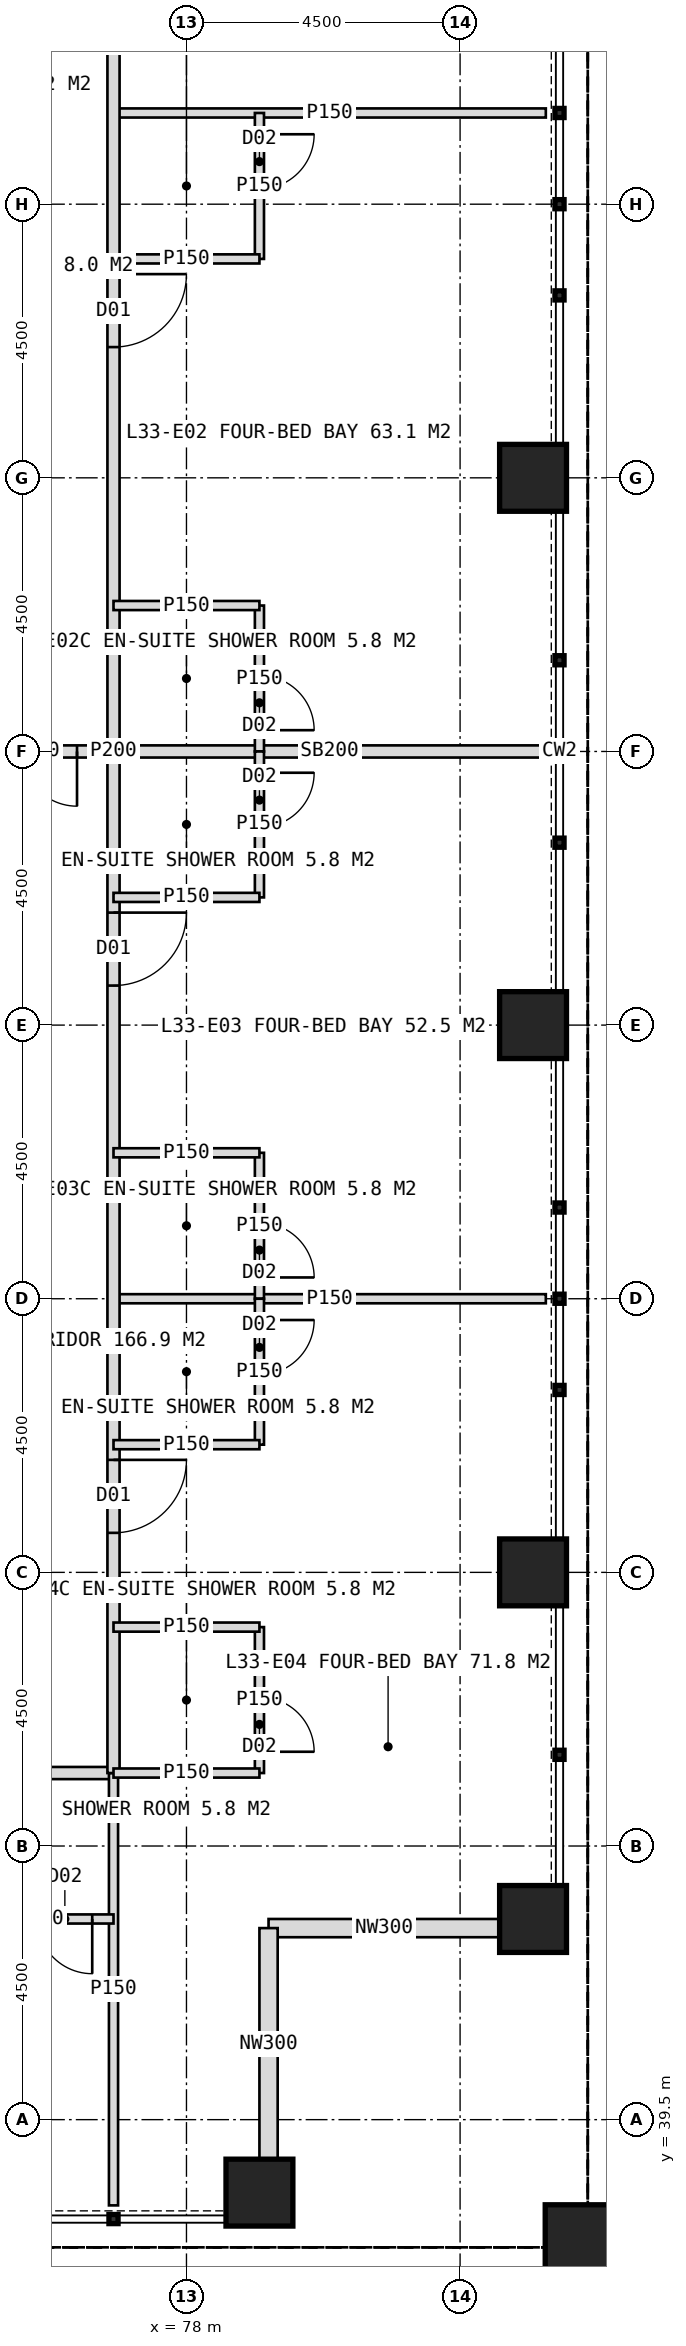
"""IFC4 building model, lengths in metres.
Left out: names, types, materials, properties, quantities, classifications, styles, units other than length and angle.
Written with IfcOpenShell. Run it as: python <this file> out.ifc"""

import sys

from ifc_helpers import new_model, si_unit, direction, frame, frame_2d, origin, origin_2d, place, context, subcontext, project, spatial, rectangle, hollow_rectangle, extrude, element, fill, save


model = new_model("IFC4")
c1 = context("Model", 3, precision=1e-05, world=origin(), true_north=direction((0.0, 1.0)))
c2 = subcontext(c1, "Body", "Model", "MODEL_VIEW")
j1 = project(units=[si_unit("LENGTHUNIT", "METRE"), si_unit("PLANEANGLEUNIT", "RADIAN")], contexts=[c1])
p1 = place(None, origin())
s1 = spatial("IfcSite", under=j1, at=p1, CompositionType="ELEMENT")
p2 = place(p1, origin())
s2 = spatial("IfcBuilding", under=s1, at=p2, CompositionType="ELEMENT")
p3 = place(p2, frame((0.0, 0.0, 140.0)))
s3 = spatial("IfcBuildingStorey", under=s2, at=p3, CompositionType="ELEMENT", Elevation=140.0)
for number, where, z_axis, x_axis in (
    (1, (83.7, 42.8, 0.0), (0.0, 0.0, 1.0), (1.0, 0.0, 0.0)),
    (2, (83.7, 48.5, 0.0), (0.0, 0.0, 1.0), (1.0, 0.0, 0.0)),
    (3, (83.7, 57.5, 0.0), (0.0, 0.0, 1.0), (1.0, 0.0, 0.0)),
    (4, (83.7, 66.5, 0.0), (0.0, 0.0, 1.0), (1.0, 0.0, 0.0)),
    (5, (79.2, 38.3, 0.0), (0.0, 0.0, 1.0), (1.0, 0.0, 0.0)),
):
    element("IfcColumn", number, at=place(p3, frame(where, z_axis=z_axis, x_axis=x_axis)), inside=s3, PredefinedType="COLUMN", context=c2, shape_type="SweptSolid", body=[
        extrude(hollow_rectangle(XDim=1.1, YDim=1.1, WallThickness=0.1, at=origin_2d()), origin(), (0.0, 0.0, 1.0), 4.0),
    ])
p4 = place(p3, frame((84.6, 37.4, 0.0), z_axis=(0.0, 0.0, 1.0), x_axis=(1.0, 0.0, 0.0)))
e6 = element("IfcColumn", 6, at=p4, inside=s3, PredefinedType="COLUMN", context=c2, shape_type="SweptSolid", body=[
    extrude(hollow_rectangle(XDim=1.4, YDim=1.4, WallThickness=0.08, at=origin_2d()), origin(), (0.0, 0.0, 1.0), 4.0),
])
for number, where, z_axis, x_axis in (
    (7, (83.15, 42.65, 0.0), (0.0, 0.0, 1.0), (-1.0, 0.0, 0.0)),
    (8, (79.35, 42.65, 0.0), (0.0, 0.0, 1.0), (0.0, -1.0, 0.0)),
):
    element("IfcWall", number, at=place(p3, frame(where, z_axis=z_axis, x_axis=x_axis)), inside=s3, PredefinedType="ELEMENTEDWALL", context=c2, shape_type="SweptSolid", body=[
        extrude(rectangle(XDim=3.8, YDim=0.3, at=frame_2d((1.9, 0.0))), origin(), (0.0, 0.0, 1.0), 4.0),
    ])
p5 = place(p3, frame((76.8, 45.2, 0.0), z_axis=(0.0, 0.0, 1.0), x_axis=(-1.0, 0.0, 0.0)))
e9 = element("IfcWall", 9, at=p5, inside=s3, PredefinedType="PARTITIONING", context=c2, shape_type="SweptSolid", body=[
    extrude(rectangle(XDim=33.6, YDim=0.2, at=frame_2d((16.8, 0.0))), origin(), (0.0, 0.0, 1.0), 3.75),
])
p6 = place(p5, frame((2.65, 0.0, 0.0)))
e10 = element("IfcOpeningElement", 10, at=p6, cuts=e9, PredefinedType="OPENING", context=c2, shape_type="SweptSolid", body=[
    extrude(rectangle(XDim=1.2, YDim=2.2, at=frame_2d((0.6, 1.1))), frame((0.0, 0.11, 0.0), z_axis=(0.0, -1.0, 0.0), x_axis=(1.0, 0.0, 0.0)), (0.0, 0.0, 1.0), 0.22),
])
p7 = place(p5, frame((11.05, 0.0, 0.0)))
e11 = element("IfcOpeningElement", 11, at=p7, cuts=e9, PredefinedType="OPENING", context=c2, shape_type="SweptSolid", body=[
    extrude(rectangle(XDim=1.2, YDim=2.2, at=frame_2d((0.6, 1.1))), frame((0.0, 0.11, 0.0), z_axis=(0.0, -1.0, 0.0), x_axis=(1.0, 0.0, 0.0)), (0.0, 0.0, 1.0), 0.22),
])
p8 = place(p5, frame((17.95, 0.0, 0.0)))
e12 = element("IfcOpeningElement", 12, at=p8, cuts=e9, PredefinedType="OPENING", context=c2, shape_type="SweptSolid", body=[
    extrude(rectangle(XDim=1.2, YDim=2.2, at=frame_2d((0.6, 1.1))), frame((0.0, 0.11, 0.0), z_axis=(0.0, -1.0, 0.0), x_axis=(1.0, 0.0, 0.0)), (0.0, 0.0, 1.0), 0.22),
])
p9 = place(p5, frame((26.95, 0.0, 0.0)))
e13 = element("IfcOpeningElement", 13, at=p9, cuts=e9, PredefinedType="OPENING", context=c2, shape_type="SweptSolid", body=[
    extrude(rectangle(XDim=1.2, YDim=2.2, at=frame_2d((0.6, 1.1))), frame((0.0, 0.11, 0.0), z_axis=(0.0, -1.0, 0.0), x_axis=(1.0, 0.0, 0.0)), (0.0, 0.0, 1.0), 0.22),
])
p10 = place(p3, frame((76.8, 45.2, 0.0), z_axis=(0.0, 0.0, 1.0), x_axis=(0.0, -1.0, 0.0)))
e14 = element("IfcWall", 14, at=p10, inside=s3, PredefinedType="PARTITIONING", context=c2, shape_type="SweptSolid", body=[
    extrude(rectangle(XDim=7.11, YDim=0.15, at=frame_2d((3.555, 0.0))), origin(), (0.0, 0.0, 1.0), 3.75),
])
p11 = place(p3, frame((76.8, 42.8, 0.0), z_axis=(0.0, 0.0, 1.0), x_axis=(-1.0, 0.0, 0.0)))
e15 = element("IfcWall", 15, at=p11, inside=s3, PredefinedType="PARTITIONING", context=c2, shape_type="SweptSolid", body=[
    extrude(rectangle(XDim=2.4, YDim=0.15, at=frame_2d((1.2, 0.0))), origin(), (0.0, 0.0, 1.0), 2.997),
])
p12 = place(p11, frame((0.35, 0.0, 0.0)))
e16 = element("IfcOpeningElement", 16, at=p12, cuts=e15, PredefinedType="OPENING", context=c2, shape_type="SweptSolid", body=[
    extrude(rectangle(XDim=0.9, YDim=2.1, at=frame_2d((0.45, 1.05))), frame((0.0, 0.085, 0.0), z_axis=(0.0, -1.0, 0.0), x_axis=(1.0, 0.0, 0.0)), (0.0, 0.0, 1.0), 0.17),
])
p13 = place(p3, frame((76.8, 72.5, 0.0), z_axis=(0.0, 0.0, 1.0), x_axis=(1.0, 0.0, 0.0)))
e17 = element("IfcWall", 17, at=p13, inside=s3, PredefinedType="PARTITIONING", context=c2, shape_type="SweptSolid", body=[
    extrude(rectangle(XDim=7.11, YDim=0.15, at=frame_2d((3.555, 0.0))), origin(), (0.0, 0.0, 1.0), 3.75),
])
p14 = place(p3, frame((76.8, 62.0, 0.0), z_axis=(0.0, 0.0, 1.0), x_axis=(1.0, 0.0, 0.0)))
e18 = element("IfcWall", 18, at=p14, inside=s3, PredefinedType="SOLIDWALL", context=c2, shape_type="SweptSolid", body=[
    extrude(rectangle(XDim=7.11, YDim=0.2, at=frame_2d((3.555, 0.0))), origin(), (0.0, 0.0, 1.0), 2.95),
])
p15 = place(p3, frame((76.8, 53.0, 0.0), z_axis=(0.0, 0.0, 1.0), x_axis=(1.0, 0.0, 0.0)))
e19 = element("IfcWall", 19, at=p15, inside=s3, PredefinedType="PARTITIONING", context=c2, shape_type="SweptSolid", body=[
    extrude(rectangle(XDim=7.11, YDim=0.15, at=frame_2d((3.555, 0.0))), origin(), (0.0, 0.0, 1.0), 3.75),
])
p16 = place(p3, frame((76.8, 78.8, 0.0), z_axis=(0.0, 0.0, 1.0), x_axis=(0.0, -1.0, 0.0)))
e20 = element("IfcWall", 20, at=p16, inside=s3, PredefinedType="PARTITIONING", context=c2, shape_type="SweptSolid", body=[
    extrude(rectangle(XDim=33.6, YDim=0.2, at=frame_2d((16.8, 0.0))), origin(), (0.0, 0.0, 1.0), 3.75),
])
p17 = place(p16, frame((2.65, 0.0, 0.0)))
e21 = element("IfcOpeningElement", 21, at=p17, cuts=e20, PredefinedType="OPENING", context=c2, shape_type="SweptSolid", body=[
    extrude(rectangle(XDim=1.2, YDim=2.2, at=frame_2d((0.6, 1.1))), frame((0.0, 0.11, 0.0), z_axis=(0.0, -1.0, 0.0), x_axis=(1.0, 0.0, 0.0)), (0.0, 0.0, 1.0), 0.22),
])
p18 = place(p16, frame((8.95, 0.0, 0.0)))
e22 = element("IfcOpeningElement", 22, at=p18, cuts=e20, PredefinedType="OPENING", context=c2, shape_type="SweptSolid", body=[
    extrude(rectangle(XDim=1.2, YDim=2.2, at=frame_2d((0.6, 1.1))), frame((0.0, 0.11, 0.0), z_axis=(0.0, -1.0, 0.0), x_axis=(1.0, 0.0, 0.0)), (0.0, 0.0, 1.0), 0.22),
])
p19 = place(p16, frame((19.45, 0.0, 0.0)))
e23 = element("IfcOpeningElement", 23, at=p19, cuts=e20, PredefinedType="OPENING", context=c2, shape_type="SweptSolid", body=[
    extrude(rectangle(XDim=1.2, YDim=2.2, at=frame_2d((0.6, 1.1))), frame((0.0, 0.11, 0.0), z_axis=(0.0, -1.0, 0.0), x_axis=(1.0, 0.0, 0.0)), (0.0, 0.0, 1.0), 0.22),
])
p20 = place(p16, frame((28.45, 0.0, 0.0)))
e24 = element("IfcOpeningElement", 24, at=p20, cuts=e20, PredefinedType="OPENING", context=c2, shape_type="SweptSolid", body=[
    extrude(rectangle(XDim=1.2, YDim=2.2, at=frame_2d((0.6, 1.1))), frame((0.0, 0.11, 0.0), z_axis=(0.0, -1.0, 0.0), x_axis=(1.0, 0.0, 0.0)), (0.0, 0.0, 1.0), 0.22),
])
p21 = place(p3, frame((79.2, 72.5, 0.0), z_axis=(0.0, 0.0, 1.0), x_axis=(0.0, -1.0, 0.0)))
e25 = element("IfcWall", 25, at=p21, inside=s3, PredefinedType="PARTITIONING", context=c2, shape_type="SweptSolid", body=[
    extrude(rectangle(XDim=2.4, YDim=0.15, at=frame_2d((1.2, 0.0))), origin(), (0.0, 0.0, 1.0), 3.75),
])
p22 = place(p21, frame((0.35, 0.0, 0.0)))
e26 = element("IfcOpeningElement", 26, at=p22, cuts=e25, PredefinedType="OPENING", context=c2, shape_type="SweptSolid", body=[
    extrude(rectangle(XDim=0.9, YDim=2.1, at=frame_2d((0.45, 1.05))), frame((0.0, 0.085, 0.0), z_axis=(0.0, -1.0, 0.0), x_axis=(1.0, 0.0, 0.0)), (0.0, 0.0, 1.0), 0.17),
])
p23 = place(p3, frame((76.8, 70.1, 0.0), z_axis=(0.0, 0.0, 1.0), x_axis=(1.0, 0.0, 0.0)))
e27 = element("IfcWall", 27, at=p23, inside=s3, PredefinedType="PARTITIONING", context=c2, shape_type="SweptSolid", body=[
    extrude(rectangle(XDim=2.4, YDim=0.15, at=frame_2d((1.2, 0.0))), origin(), (0.0, 0.0, 1.0), 3.75),
])
p24 = place(p3, frame((79.2, 64.4, 0.0), z_axis=(0.0, 0.0, 1.0), x_axis=(0.0, -1.0, 0.0)))
e28 = element("IfcWall", 28, at=p24, inside=s3, PredefinedType="PARTITIONING", context=c2, shape_type="SweptSolid", body=[
    extrude(rectangle(XDim=2.4, YDim=0.15, at=frame_2d((1.2, 0.0))), origin(), (0.0, 0.0, 1.0), 3.75),
])
p25 = place(p24, frame((1.15, 0.0, 0.0)))
e29 = element("IfcOpeningElement", 29, at=p25, cuts=e28, PredefinedType="OPENING", context=c2, shape_type="SweptSolid", body=[
    extrude(rectangle(XDim=0.9, YDim=2.1, at=frame_2d((0.45, 1.05))), frame((0.0, 0.085, 0.0), z_axis=(0.0, -1.0, 0.0), x_axis=(1.0, 0.0, 0.0)), (0.0, 0.0, 1.0), 0.17),
])
p26 = place(p3, frame((76.8, 64.4, 0.0), z_axis=(0.0, 0.0, 1.0), x_axis=(1.0, 0.0, 0.0)))
e30 = element("IfcWall", 30, at=p26, inside=s3, PredefinedType="PARTITIONING", context=c2, shape_type="SweptSolid", body=[
    extrude(rectangle(XDim=2.4, YDim=0.15, at=frame_2d((1.2, 0.0))), origin(), (0.0, 0.0, 1.0), 3.75),
])
p27 = place(p3, frame((79.2, 62.0, 0.0), z_axis=(0.0, 0.0, 1.0), x_axis=(0.0, -1.0, 0.0)))
e31 = element("IfcWall", 31, at=p27, inside=s3, PredefinedType="PARTITIONING", context=c2, shape_type="SweptSolid", body=[
    extrude(rectangle(XDim=2.4, YDim=0.15, at=frame_2d((1.2, 0.0))), origin(), (0.0, 0.0, 1.0), 3.75),
])
p28 = place(p27, frame((0.35, 0.0, 0.0)))
e32 = element("IfcOpeningElement", 32, at=p28, cuts=e31, PredefinedType="OPENING", context=c2, shape_type="SweptSolid", body=[
    extrude(rectangle(XDim=0.9, YDim=2.1, at=frame_2d((0.45, 1.05))), frame((0.0, 0.085, 0.0), z_axis=(0.0, -1.0, 0.0), x_axis=(1.0, 0.0, 0.0)), (0.0, 0.0, 1.0), 0.17),
])
p29 = place(p3, frame((76.8, 59.6, 0.0), z_axis=(0.0, 0.0, 1.0), x_axis=(1.0, 0.0, 0.0)))
e33 = element("IfcWall", 33, at=p29, inside=s3, PredefinedType="PARTITIONING", context=c2, shape_type="SweptSolid", body=[
    extrude(rectangle(XDim=2.4, YDim=0.15, at=frame_2d((1.2, 0.0))), origin(), (0.0, 0.0, 1.0), 3.75),
])
p30 = place(p3, frame((79.2, 55.4, 0.0), z_axis=(0.0, 0.0, 1.0), x_axis=(0.0, -1.0, 0.0)))
e34 = element("IfcWall", 34, at=p30, inside=s3, PredefinedType="PARTITIONING", context=c2, shape_type="SweptSolid", body=[
    extrude(rectangle(XDim=2.4, YDim=0.15, at=frame_2d((1.2, 0.0))), origin(), (0.0, 0.0, 1.0), 3.75),
])
p31 = place(p30, frame((1.15, 0.0, 0.0)))
e35 = element("IfcOpeningElement", 35, at=p31, cuts=e34, PredefinedType="OPENING", context=c2, shape_type="SweptSolid", body=[
    extrude(rectangle(XDim=0.9, YDim=2.1, at=frame_2d((0.45, 1.05))), frame((0.0, 0.085, 0.0), z_axis=(0.0, -1.0, 0.0), x_axis=(1.0, 0.0, 0.0)), (0.0, 0.0, 1.0), 0.17),
])
p32 = place(p3, frame((76.8, 55.4, 0.0), z_axis=(0.0, 0.0, 1.0), x_axis=(1.0, 0.0, 0.0)))
e36 = element("IfcWall", 36, at=p32, inside=s3, PredefinedType="PARTITIONING", context=c2, shape_type="SweptSolid", body=[
    extrude(rectangle(XDim=2.4, YDim=0.15, at=frame_2d((1.2, 0.0))), origin(), (0.0, 0.0, 1.0), 3.75),
])
p33 = place(p3, frame((79.2, 53.0, 0.0), z_axis=(0.0, 0.0, 1.0), x_axis=(0.0, -1.0, 0.0)))
e37 = element("IfcWall", 37, at=p33, inside=s3, PredefinedType="PARTITIONING", context=c2, shape_type="SweptSolid", body=[
    extrude(rectangle(XDim=2.4, YDim=0.15, at=frame_2d((1.2, 0.0))), origin(), (0.0, 0.0, 1.0), 3.75),
])
p34 = place(p33, frame((0.35, 0.0, 0.0)))
e38 = element("IfcOpeningElement", 38, at=p34, cuts=e37, PredefinedType="OPENING", context=c2, shape_type="SweptSolid", body=[
    extrude(rectangle(XDim=0.9, YDim=2.1, at=frame_2d((0.45, 1.05))), frame((0.0, 0.085, 0.0), z_axis=(0.0, -1.0, 0.0), x_axis=(1.0, 0.0, 0.0)), (0.0, 0.0, 1.0), 0.17),
])
p35 = place(p3, frame((76.8, 50.6, 0.0), z_axis=(0.0, 0.0, 1.0), x_axis=(1.0, 0.0, 0.0)))
e39 = element("IfcWall", 39, at=p35, inside=s3, PredefinedType="PARTITIONING", context=c2, shape_type="SweptSolid", body=[
    extrude(rectangle(XDim=2.4, YDim=0.15, at=frame_2d((1.2, 0.0))), origin(), (0.0, 0.0, 1.0), 3.75),
])
p36 = place(p3, frame((79.2, 47.6, 0.0), z_axis=(0.0, 0.0, 1.0), x_axis=(0.0, -1.0, 0.0)))
e40 = element("IfcWall", 40, at=p36, inside=s3, PredefinedType="PARTITIONING", context=c2, shape_type="SweptSolid", body=[
    extrude(rectangle(XDim=2.4, YDim=0.15, at=frame_2d((1.2, 0.0))), origin(), (0.0, 0.0, 1.0), 2.997),
])
p37 = place(p36, frame((1.15, 0.0, 0.0)))
e41 = element("IfcOpeningElement", 41, at=p37, cuts=e40, PredefinedType="OPENING", context=c2, shape_type="SweptSolid", body=[
    extrude(rectangle(XDim=0.9, YDim=2.1, at=frame_2d((0.45, 1.05))), frame((0.0, 0.085, 0.0), z_axis=(0.0, -1.0, 0.0), x_axis=(1.0, 0.0, 0.0)), (0.0, 0.0, 1.0), 0.17),
])
for number, where, z_axis, x_axis in (
    (42, (76.8, 47.6, 0.0), (0.0, 0.0, 1.0), (1.0, 0.0, 0.0)),
    (43, (76.8, 45.2, 0.0), (0.0, 0.0, 1.0), (1.0, 0.0, 0.0)),
):
    element("IfcWall", number, at=place(p3, frame(where, z_axis=z_axis, x_axis=x_axis)), inside=s3, PredefinedType="PARTITIONING", context=c2, shape_type="SweptSolid", body=[
        extrude(rectangle(XDim=2.4, YDim=0.15, at=frame_2d((1.2, 0.0))), origin(), (0.0, 0.0, 1.0), 3.75),
    ])
p38 = place(p3, frame((74.1, 62.0, 0.0), z_axis=(0.0, 0.0, 1.0), x_axis=(1.0, 0.0, 0.0)))
e44 = element("IfcWall", 44, at=p38, inside=s3, PredefinedType="SOLIDWALL", context=c2, shape_type="SweptSolid", body=[
    extrude(rectangle(XDim=2.7, YDim=0.2, at=frame_2d((1.35, 0.0))), origin(), (0.0, 0.0, 1.0), 2.95),
])
p39 = place(p38, frame((0.3, 0.0, 0.0)))
e45 = element("IfcOpeningElement", 45, at=p39, cuts=e44, PredefinedType="OPENING", context=c2, shape_type="SweptSolid", body=[
    extrude(rectangle(XDim=1.8, YDim=2.2, at=frame_2d((0.9, 1.1))), frame((0.0, 0.11, 0.0), z_axis=(0.0, -1.0, 0.0), x_axis=(1.0, 0.0, 0.0)), (0.0, 0.0, 1.0), 0.22),
])
p40 = place(p12, origin())
e46 = element("IfcDoor", 46, at=p40, inside=s3, OperationType="SINGLE_SWING_LEFT", PredefinedType="DOOR", context=c2, shape_type="SweptSolid", body=[
    extrude(rectangle(XDim=0.9, YDim=2.1, at=frame_2d((0.45, 1.05))), frame((0.0, 0.025, 0.0), z_axis=(0.0, -1.0, 0.0), x_axis=(1.0, 0.0, 0.0)), (0.0, 0.0, 1.0), 0.05),
])
fill(e16, e46)
p41 = place(p18, origin())
e47 = element("IfcDoor", 47, at=p41, inside=s3, OperationType="SINGLE_SWING_LEFT", PredefinedType="DOOR", context=c2, shape_type="SweptSolid", body=[
    extrude(rectangle(XDim=1.2, YDim=2.2, at=frame_2d((0.6, 1.1))), frame((0.0, 0.025, 0.0), z_axis=(0.0, -1.0, 0.0), x_axis=(1.0, 0.0, 0.0)), (0.0, 0.0, 1.0), 0.05),
])
fill(e22, e47)
p42 = place(p22, origin())
e48 = element("IfcDoor", 48, at=p42, inside=s3, OperationType="SINGLE_SWING_LEFT", PredefinedType="DOOR", context=c2, shape_type="SweptSolid", body=[
    extrude(rectangle(XDim=0.9, YDim=2.1, at=frame_2d((0.45, 1.05))), frame((0.0, 0.025, 0.0), z_axis=(0.0, -1.0, 0.0), x_axis=(1.0, 0.0, 0.0)), (0.0, 0.0, 1.0), 0.05),
])
fill(e26, e48)
p43 = place(p25, origin())
e49 = element("IfcDoor", 49, at=p43, inside=s3, OperationType="SINGLE_SWING_RIGHT", PredefinedType="DOOR", context=c2, shape_type="SweptSolid", body=[
    extrude(rectangle(XDim=0.9, YDim=2.1, at=frame_2d((0.45, 1.05))), frame((0.0, 0.025, 0.0), z_axis=(0.0, -1.0, 0.0), x_axis=(1.0, 0.0, 0.0)), (0.0, 0.0, 1.0), 0.05),
])
fill(e29, e49)
p44 = place(p19, origin())
e50 = element("IfcDoor", 50, at=p44, inside=s3, OperationType="SINGLE_SWING_LEFT", PredefinedType="DOOR", context=c2, shape_type="SweptSolid", body=[
    extrude(rectangle(XDim=1.2, YDim=2.2, at=frame_2d((0.6, 1.1))), frame((0.0, 0.025, 0.0), z_axis=(0.0, -1.0, 0.0), x_axis=(1.0, 0.0, 0.0)), (0.0, 0.0, 1.0), 0.05),
])
fill(e23, e50)
p45 = place(p28, origin())
e51 = element("IfcDoor", 51, at=p45, inside=s3, OperationType="SINGLE_SWING_LEFT", PredefinedType="DOOR", context=c2, shape_type="SweptSolid", body=[
    extrude(rectangle(XDim=0.9, YDim=2.1, at=frame_2d((0.45, 1.05))), frame((0.0, 0.025, 0.0), z_axis=(0.0, -1.0, 0.0), x_axis=(1.0, 0.0, 0.0)), (0.0, 0.0, 1.0), 0.05),
])
fill(e32, e51)
p46 = place(p31, origin())
e52 = element("IfcDoor", 52, at=p46, inside=s3, OperationType="SINGLE_SWING_RIGHT", PredefinedType="DOOR", context=c2, shape_type="SweptSolid", body=[
    extrude(rectangle(XDim=0.9, YDim=2.1, at=frame_2d((0.45, 1.05))), frame((0.0, 0.025, 0.0), z_axis=(0.0, -1.0, 0.0), x_axis=(1.0, 0.0, 0.0)), (0.0, 0.0, 1.0), 0.05),
])
fill(e35, e52)
p47 = place(p20, origin())
e53 = element("IfcDoor", 53, at=p47, inside=s3, OperationType="SINGLE_SWING_LEFT", PredefinedType="DOOR", context=c2, shape_type="SweptSolid", body=[
    extrude(rectangle(XDim=1.2, YDim=2.2, at=frame_2d((0.6, 1.1))), frame((0.0, 0.025, 0.0), z_axis=(0.0, -1.0, 0.0), x_axis=(1.0, 0.0, 0.0)), (0.0, 0.0, 1.0), 0.05),
])
fill(e24, e53)
p48 = place(p34, origin())
e54 = element("IfcDoor", 54, at=p48, inside=s3, OperationType="SINGLE_SWING_LEFT", PredefinedType="DOOR", context=c2, shape_type="SweptSolid", body=[
    extrude(rectangle(XDim=0.9, YDim=2.1, at=frame_2d((0.45, 1.05))), frame((0.0, 0.025, 0.0), z_axis=(0.0, -1.0, 0.0), x_axis=(1.0, 0.0, 0.0)), (0.0, 0.0, 1.0), 0.05),
])
fill(e38, e54)
p49 = place(p37, origin())
e55 = element("IfcDoor", 55, at=p49, inside=s3, OperationType="SINGLE_SWING_RIGHT", PredefinedType="DOOR", context=c2, shape_type="SweptSolid", body=[
    extrude(rectangle(XDim=0.9, YDim=2.1, at=frame_2d((0.45, 1.05))), frame((0.0, 0.025, 0.0), z_axis=(0.0, -1.0, 0.0), x_axis=(1.0, 0.0, 0.0)), (0.0, 0.0, 1.0), 0.05),
])
fill(e41, e55)
p50 = place(p39, origin())
e56 = element("IfcDoor", 56, at=p50, inside=s3, OperationType="DOUBLE_DOOR_DOUBLE_SWING", PredefinedType="DOOR", context=c2, shape_type="SweptSolid", body=[
    extrude(rectangle(XDim=1.8, YDim=2.2, at=frame_2d((0.9, 1.1))), frame((0.0, 0.025, 0.0), z_axis=(0.0, -1.0, 0.0), x_axis=(1.0, 0.0, 0.0)), (0.0, 0.0, 1.0), 0.05),
])
fill(e45, e56)
save(model, sys.argv[1])
